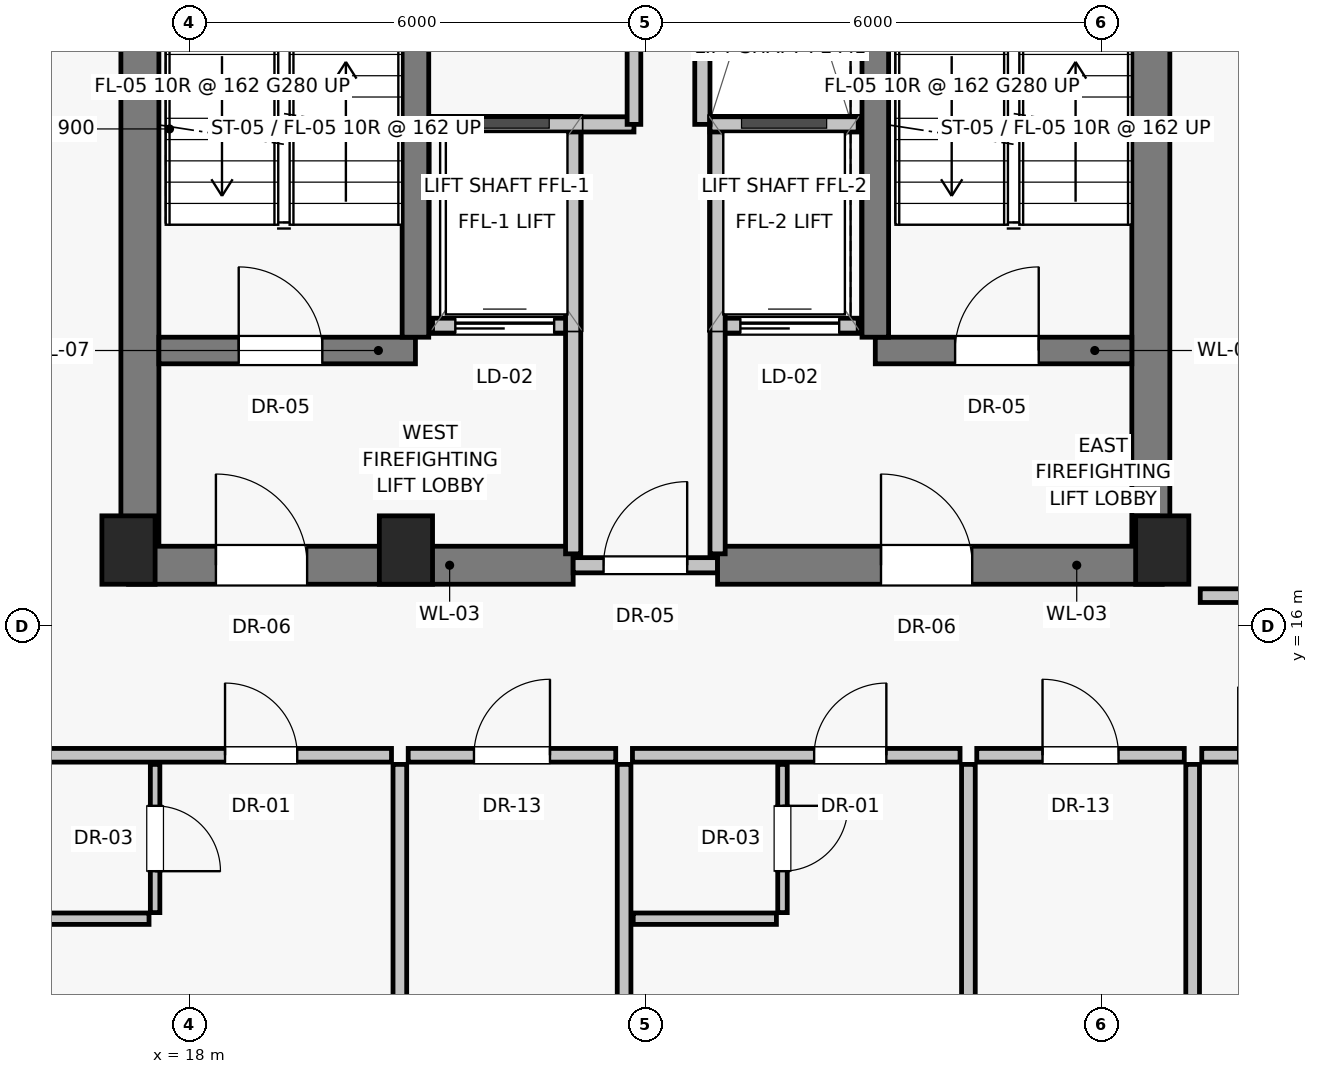
"""IFC4 building model, lengths in metres.
Left out: names, types, materials, properties, quantities, classifications, styles, units other than length and angle.
Written with IfcOpenShell. Run it as: python <this file> out.ifc"""

import sys

from ifc_helpers import new_model, si_unit, direction, frame, frame_2d, origin, origin_2d, place, context, subcontext, project, spatial, rectangle, extrude, source, transform, mapped, element, fill, save


model = new_model("IFC4")
c1 = context("Model", 3, precision=1e-05, world=origin(), true_north=direction((0.0, 1.0)))
c2 = subcontext(c1, "Body", "Model", "MODEL_VIEW")
j1 = project(units=[si_unit("LENGTHUNIT", "METRE"), si_unit("PLANEANGLEUNIT", "RADIAN")], contexts=[c1])
p1 = place(None, origin())
s1 = spatial("IfcSite", under=j1, at=p1, CompositionType="ELEMENT")
p2 = place(p1, origin())
s2 = spatial("IfcBuilding", under=s1, at=p2, CompositionType="ELEMENT")
p3 = place(p2, frame((0.0, 0.0, 182.1)))
s3 = spatial("IfcBuildingStorey", under=s2, at=p3, CompositionType="ELEMENT", Elevation=182.1)
for number, where, z_axis, x_axis in (
    (1, (17.2, 17.0, 0.0), (0.0, 0.0, 1.0), (1.0, 0.0, 0.0)),
    (2, (20.85, 17.0, 0.0), (0.0, 0.0, 1.0), (1.0, 0.0, 0.0)),
    (3, (30.8, 17.0, 0.0), (0.0, 0.0, 1.0), (1.0, 0.0, 0.0)),
):
    element("IfcColumn", number, at=place(p3, frame(where, z_axis=z_axis, x_axis=x_axis)), inside=s3, PredefinedType="PILASTER", context=c2, shape_type="SweptSolid", body=[
        extrude(rectangle(XDim=0.7, YDim=0.9, at=origin_2d()), origin(), (0.0, 0.0, 1.0), 3.25),
    ])
for number, where, z_axis, x_axis in (
    (4, (17.35, 16.8, 0.0), (0.0, 0.0, 1.0), (0.0, 1.0, 0.0)),
    (5, (30.65, 16.8, 0.0), (0.0, 0.0, 1.0), (0.0, 1.0, 0.0)),
):
    element("IfcWall", number, at=place(p3, frame(where, z_axis=z_axis, x_axis=x_axis)), inside=s3, PredefinedType="SHEAR", context=c2, shape_type="SweptSolid", body=[
        extrude(rectangle(XDim=14.2, YDim=0.5, at=frame_2d((7.1, 0.0))), origin(), (0.0, 0.0, 1.0), 3.015),
    ])
p4 = place(p3, frame((17.2, 16.8, 0.0), z_axis=(0.0, 0.0, 1.0), x_axis=(1.0, 0.0, 0.0)))
e6 = element("IfcWall", 6, at=p4, inside=s3, PredefinedType="SHEAR", context=c2, shape_type="SweptSolid", body=[
    extrude(rectangle(XDim=5.85, YDim=0.5, at=frame_2d((2.925, 0.0))), origin(), (0.0, 0.0, 1.0), 3.015),
])
p5 = place(p4, frame((1.15, 0.0, 0.0)))
e7 = element("IfcOpeningElement", 7, at=p5, cuts=e6, PredefinedType="OPENING", context=c2, shape_type="SweptSolid", body=[
    extrude(rectangle(XDim=1.2, YDim=2.03, at=frame_2d((0.6, 1.015))), frame((0.0, 0.26, 0.0), z_axis=(0.0, -1.0, 0.0), x_axis=(1.0, 0.0, 0.0)), (0.0, 0.0, 1.0), 0.52),
])
p6 = place(p3, frame((23.05, 16.8, 0.0), z_axis=(0.0, 0.0, 1.0), x_axis=(1.0, 0.0, 0.0)))
e8 = element("IfcWall", 8, at=p6, inside=s3, PredefinedType="SOLIDWALL", context=c2, shape_type="SweptSolid", body=[
    extrude(rectangle(XDim=1.9, YDim=0.2, at=frame_2d((0.95, 0.0))), origin(), (0.0, 0.0, 1.0), 2.165),
])
p7 = place(p6, frame((0.4, 0.0, 0.0)))
e9 = element("IfcOpeningElement", 9, at=p7, cuts=e8, PredefinedType="OPENING", context=c2, shape_type="SweptSolid", body=[
    extrude(rectangle(XDim=1.1, YDim=2.03, at=frame_2d((0.55, 1.015))), frame((0.0, 0.11, 0.0), z_axis=(0.0, -1.0, 0.0), x_axis=(1.0, 0.0, 0.0)), (0.0, 0.0, 1.0), 0.22),
])
p8 = place(p3, frame((24.95, 16.8, 0.0), z_axis=(0.0, 0.0, 1.0), x_axis=(1.0, 0.0, 0.0)))
e10 = element("IfcWall", 10, at=p8, inside=s3, PredefinedType="SHEAR", context=c2, shape_type="SweptSolid", body=[
    extrude(rectangle(XDim=5.85, YDim=0.5, at=frame_2d((2.925, 0.0))), origin(), (0.0, 0.0, 1.0), 3.015),
])
p9 = place(p8, frame((2.15, 0.0, 0.0)))
e11 = element("IfcOpeningElement", 11, at=p9, cuts=e10, PredefinedType="OPENING", context=c2, shape_type="SweptSolid", body=[
    extrude(rectangle(XDim=1.2, YDim=2.03, at=frame_2d((0.6, 1.015))), frame((0.0, 0.26, 0.0), z_axis=(0.0, -1.0, 0.0), x_axis=(1.0, 0.0, 0.0)), (0.0, 0.0, 1.0), 0.52),
])
p10 = place(p3, frame((17.6, 19.625, 0.0), z_axis=(0.0, 0.0, 1.0), x_axis=(1.0, 0.0, 0.0)))
e12 = element("IfcWall", 12, at=p10, inside=s3, PredefinedType="SHEAR", context=c2, shape_type="SweptSolid", body=[
    extrude(rectangle(XDim=3.375, YDim=0.35, at=frame_2d((1.688, 0.0))), origin(), (0.0, 0.0, 1.0), 3.015),
])
p11 = place(p10, frame((1.05, 0.0, 0.0)))
e13 = element("IfcOpeningElement", 13, at=p11, cuts=e12, PredefinedType="OPENING", context=c2, shape_type="SweptSolid", body=[
    extrude(rectangle(XDim=1.1, YDim=2.03, at=frame_2d((0.55, 1.015))), frame((0.0, 0.185, 0.0), z_axis=(0.0, -1.0, 0.0), x_axis=(1.0, 0.0, 0.0)), (0.0, 0.0, 1.0), 0.37),
])
p12 = place(p3, frame((21.2, 19.95, 0.0), z_axis=(0.0, 0.0, 1.0), x_axis=(1.0, 0.0, 0.0)))
e14 = element("IfcWall", 14, at=p12, inside=s3, PredefinedType="SOLIDWALL", context=c2, shape_type="SweptSolid", body=[
    extrude(rectangle(XDim=1.85, YDim=0.2, at=frame_2d((0.925, 0.0))), origin(), (0.0, 0.0, 1.0), 3.015),
])
p13 = place(p12, frame((0.3, 0.0, 0.0)))
e15 = element("IfcOpeningElement", 15, at=p13, cuts=e14, PredefinedType="OPENING", context=c2, shape_type="SweptSolid", body=[
    extrude(rectangle(XDim=1.3, YDim=2.25, at=frame_2d((0.65, 1.125))), frame((0.0, 0.11, 0.0), z_axis=(0.0, -1.0, 0.0), x_axis=(1.0, 0.0, 0.0)), (0.0, 0.0, 1.0), 0.22),
])
p14 = place(p3, frame((24.95, 19.95, 0.0), z_axis=(0.0, 0.0, 1.0), x_axis=(1.0, 0.0, 0.0)))
e16 = element("IfcWall", 16, at=p14, inside=s3, PredefinedType="SOLIDWALL", context=c2, shape_type="SweptSolid", body=[
    extrude(rectangle(XDim=1.85, YDim=0.2, at=frame_2d((0.925, 0.0))), origin(), (0.0, 0.0, 1.0), 3.015),
])
p15 = place(p14, frame((0.3, 0.0, 0.0)))
e17 = element("IfcOpeningElement", 17, at=p15, cuts=e16, PredefinedType="OPENING", context=c2, shape_type="SweptSolid", body=[
    extrude(rectangle(XDim=1.3, YDim=2.25, at=frame_2d((0.65, 1.125))), frame((0.0, 0.11, 0.0), z_axis=(0.0, -1.0, 0.0), x_axis=(1.0, 0.0, 0.0)), (0.0, 0.0, 1.0), 0.22),
])
p16 = place(p3, frame((27.025, 19.625, 0.0), z_axis=(0.0, 0.0, 1.0), x_axis=(1.0, 0.0, 0.0)))
e18 = element("IfcWall", 18, at=p16, inside=s3, PredefinedType="SHEAR", context=c2, shape_type="SweptSolid", body=[
    extrude(rectangle(XDim=3.375, YDim=0.35, at=frame_2d((1.688, 0.0))), origin(), (0.0, 0.0, 1.0), 3.015),
])
p17 = place(p16, frame((1.05, 0.0, 0.0)))
e19 = element("IfcOpeningElement", 19, at=p17, cuts=e18, PredefinedType="OPENING", context=c2, shape_type="SweptSolid", body=[
    extrude(rectangle(XDim=1.1, YDim=2.03, at=frame_2d((0.55, 1.015))), frame((0.0, 0.185, 0.0), z_axis=(0.0, -1.0, 0.0), x_axis=(1.0, 0.0, 0.0)), (0.0, 0.0, 1.0), 0.37),
])
for number, where, z_axis, x_axis in (
    (20, (20.975, 19.8, 0.0), (0.0, 0.0, 1.0), (0.0, 1.0, 0.0)),
    (21, (27.025, 19.8, 0.0), (0.0, 0.0, 1.0), (0.0, 1.0, 0.0)),
):
    element("IfcWall", number, at=place(p3, frame(where, z_axis=z_axis, x_axis=x_axis)), inside=s3, PredefinedType="SHEAR", context=c2, shape_type="SweptSolid", body=[
        extrude(rectangle(XDim=8.775, YDim=0.35, at=frame_2d((4.387, 0.0))), origin(), (0.0, 0.0, 1.0), 3.015),
    ])
for number, where, z_axis, x_axis in (
    (22, (23.05, 16.95, 0.0), (0.0, 0.0, 1.0), (0.0, 1.0, 0.0)),
    (23, (24.95, 16.95, 0.0), (0.0, 0.0, 1.0), (0.0, 1.0, 0.0)),
):
    element("IfcWall", number, at=place(p3, frame(where, z_axis=z_axis, x_axis=x_axis)), inside=s3, PredefinedType="SOLIDWALL", context=c2, shape_type="SweptSolid", body=[
        extrude(rectangle(XDim=5.6, YDim=0.2, at=frame_2d((2.8, 0.0))), origin(), (0.0, 0.0, 1.0), 3.015),
    ])
p18 = place(p3, frame((21.2, 22.6, 0.0), z_axis=(0.0, 0.0, 1.0), x_axis=(1.0, 0.0, 0.0)))
e24 = element("IfcWall", 24, at=p18, inside=s3, PredefinedType="SOLIDWALL", context=c2, shape_type="SweptSolid", body=[
    extrude(rectangle(XDim=2.65, YDim=0.2, at=frame_2d((1.325, 0.0))), origin(), (0.0, 0.0, 1.0), 3.015),
])
p19 = place(p3, frame((24.85, 22.6, 0.0), z_axis=(0.0, 0.0, 1.0), x_axis=(1.0, 0.0, 0.0)))
e25 = element("IfcWall", 25, at=p19, inside=s3, PredefinedType="SOLIDWALL", context=c2, shape_type="SweptSolid", body=[
    extrude(rectangle(XDim=1.95, YDim=0.2, at=frame_2d((0.975, 0.0))), origin(), (0.0, 0.0, 1.0), 3.015),
])
p20 = place(p3, frame((23.85, 22.6, 0.0), z_axis=(0.0, 0.0, 1.0), x_axis=(0.0, 1.0, 0.0)))
e26 = element("IfcWall", 26, at=p20, inside=s3, PredefinedType="PARTITIONING", context=c2, shape_type="SweptSolid", body=[
    extrude(rectangle(XDim=6.1, YDim=0.18, at=frame_2d((3.05, 0.0))), origin(), (0.0, 0.0, 1.0), 3.015),
])
p21 = place(p20, frame((2.4, 0.0, 0.0)))
e27 = element("IfcOpeningElement", 27, at=p21, cuts=e26, PredefinedType="OPENING", context=c2, shape_type="SweptSolid", body=[
    extrude(rectangle(XDim=0.9, YDim=2.01, at=frame_2d((0.45, 1.005))), frame((0.0, 0.1, 0.0), z_axis=(0.0, -1.0, 0.0), x_axis=(1.0, 0.0, 0.0)), (0.0, 0.0, 1.0), 0.2),
])
p22 = place(p3, frame((24.75, 22.6, 0.0), z_axis=(0.0, 0.0, 1.0), x_axis=(0.0, 1.0, 0.0)))
e28 = element("IfcWall", 28, at=p22, inside=s3, PredefinedType="SOLIDWALL", context=c2, shape_type="SweptSolid", body=[
    extrude(rectangle(XDim=5.95, YDim=0.2, at=frame_2d((2.975, 0.0))), origin(), (0.0, 0.0, 1.0), 3.015),
])
p23 = place(p3, frame((31.2, 14.18, 0.0), z_axis=(0.0, 0.0, 1.0), x_axis=(0.0, -1.0, 0.0)))
e29 = element("IfcWall", 29, at=p23, inside=s3, PredefinedType="PARTITIONING", context=c2, shape_type="SweptSolid", body=[
    extrude(rectangle(XDim=6.991, YDim=0.18, at=frame_2d((3.495, 0.0))), origin(), (0.0, 0.0, 1.0), 3.015),
])
p24 = place(p3, frame((20.88, 14.3, 0.0), z_axis=(0.0, 0.0, 1.0), x_axis=(1.0, 0.0, 0.0)))
e30 = element("IfcWall", 30, at=p24, inside=s3, PredefinedType="PARTITIONING", context=c2, shape_type="SweptSolid", body=[
    extrude(rectangle(XDim=2.73, YDim=0.18, at=frame_2d((1.365, 0.0))), origin(), (0.0, 0.0, 1.0), 3.015),
])
p25 = place(p24, frame((0.865, 0.0, 0.0)))
e31 = element("IfcOpeningElement", 31, at=p25, cuts=e30, PredefinedType="OPENING", context=c2, shape_type="SweptSolid", body=[
    extrude(rectangle(XDim=1.0, YDim=2.01, at=frame_2d((0.5, 1.005))), frame((0.0, 0.1, 0.0), z_axis=(0.0, -1.0, 0.0), x_axis=(1.0, 0.0, 0.0)), (0.0, 0.0, 1.0), 0.2),
])
p26 = place(p3, frame((20.77, 14.18, 0.0), z_axis=(0.0, 0.0, 1.0), x_axis=(0.0, -1.0, 0.0)))
e32 = element("IfcWall", 32, at=p26, inside=s3, PredefinedType="PARTITIONING", context=c2, shape_type="SweptSolid", body=[
    extrude(rectangle(XDim=8.063, YDim=0.18, at=frame_2d((4.031, 0.0))), origin(), (0.0, 0.0, 1.0), 2.469),
])
p27 = place(p3, frame((15.31, 14.3, 0.0), z_axis=(0.0, 0.0, 1.0), x_axis=(1.0, 0.0, 0.0)))
e33 = element("IfcWall", 33, at=p27, inside=s3, PredefinedType="PARTITIONING", context=c2, shape_type="SweptSolid", body=[
    extrude(rectangle(XDim=5.35, YDim=0.18, at=frame_2d((2.675, 0.0))), origin(), (0.0, 0.0, 1.0), 3.015),
])
p28 = place(p27, frame((3.16, 0.0, 0.0)))
e34 = element("IfcOpeningElement", 34, at=p28, cuts=e33, PredefinedType="OPENING", context=c2, shape_type="SweptSolid", body=[
    extrude(rectangle(XDim=0.95, YDim=2.02, at=frame_2d((0.475, 1.01))), frame((0.0, 0.1, 0.0), z_axis=(0.0, -1.0, 0.0), x_axis=(1.0, 0.0, 0.0)), (0.0, 0.0, 1.0), 0.2),
])
p29 = place(p3, frame((17.55, 14.18, 0.0), z_axis=(0.0, 0.0, 1.0), x_axis=(0.0, -1.0, 0.0)))
e35 = element("IfcWall", 35, at=p29, inside=s3, PredefinedType="PARTITIONING", context=c2, shape_type="SweptSolid", body=[
    extrude(rectangle(XDim=1.95, YDim=0.125, at=frame_2d((0.975, 0.0))), origin(), (0.0, 0.0, 1.0), 3.015),
])
p30 = place(p29, frame((0.545, 0.0, 0.0)))
e36 = element("IfcOpeningElement", 36, at=p30, cuts=e35, PredefinedType="OPENING", context=c2, shape_type="SweptSolid", body=[
    extrude(rectangle(XDim=0.86, YDim=2.01, at=frame_2d((0.43, 1.005))), frame((0.0, 0.073, 0.0), z_axis=(0.0, -1.0, 0.0), x_axis=(1.0, 0.0, 0.0)), (0.0, 0.0, 1.0), 0.145),
])
p31 = place(p3, frame((15.32, 12.15, 0.0), z_axis=(0.0, 0.0, 1.0), x_axis=(1.0, 0.0, 0.0)))
e37 = element("IfcWall", 37, at=p31, inside=s3, PredefinedType="PARTITIONING", context=c2, shape_type="SweptSolid", body=[
    extrude(rectangle(XDim=2.15, YDim=0.15, at=frame_2d((1.075, 0.0))), origin(), (0.0, 0.0, 1.0), 3.015),
])
p32 = place(p3, frame((23.72, 14.18, 0.0), z_axis=(0.0, 0.0, 1.0), x_axis=(0.0, -1.0, 0.0)))
e38 = element("IfcWall", 38, at=p32, inside=s3, PredefinedType="PARTITIONING", context=c2, shape_type="SweptSolid", body=[
    extrude(rectangle(XDim=9.301, YDim=0.18, at=frame_2d((4.65, 0.0))), origin(), (0.0, 0.0, 1.0), 3.015),
])
p33 = place(p3, frame((28.36, 14.3, 0.0), z_axis=(0.0, 0.0, 1.0), x_axis=(1.0, 0.0, 0.0)))
e39 = element("IfcWall", 39, at=p33, inside=s3, PredefinedType="PARTITIONING", context=c2, shape_type="SweptSolid", body=[
    extrude(rectangle(XDim=2.73, YDim=0.18, at=frame_2d((1.365, 0.0))), origin(), (0.0, 0.0, 1.0), 3.015),
])
p34 = place(p33, frame((0.865, 0.0, 0.0)))
e40 = element("IfcOpeningElement", 40, at=p34, cuts=e39, PredefinedType="OPENING", context=c2, shape_type="SweptSolid", body=[
    extrude(rectangle(XDim=1.0, YDim=2.01, at=frame_2d((0.5, 1.005))), frame((0.0, 0.1, 0.0), z_axis=(0.0, -1.0, 0.0), x_axis=(1.0, 0.0, 0.0)), (0.0, 0.0, 1.0), 0.2),
])
p35 = place(p3, frame((28.25, 14.18, 0.0), z_axis=(0.0, 0.0, 1.0), x_axis=(0.0, -1.0, 0.0)))
e41 = element("IfcWall", 41, at=p35, inside=s3, PredefinedType="PARTITIONING", context=c2, shape_type="SweptSolid", body=[
    extrude(rectangle(XDim=9.169, YDim=0.18, at=frame_2d((4.584, 0.0))), origin(), (0.0, 0.0, 1.0), 2.469),
])
p36 = place(p3, frame((23.83, 14.3, 0.0), z_axis=(0.0, 0.0, 1.0), x_axis=(1.0, 0.0, 0.0)))
e42 = element("IfcWall", 42, at=p36, inside=s3, PredefinedType="PARTITIONING", context=c2, shape_type="SweptSolid", body=[
    extrude(rectangle(XDim=4.31, YDim=0.18, at=frame_2d((2.155, 0.0))), origin(), (0.0, 0.0, 1.0), 3.015),
])
p37 = place(p36, frame((2.39, 0.0, 0.0)))
e43 = element("IfcOpeningElement", 43, at=p37, cuts=e42, PredefinedType="OPENING", context=c2, shape_type="SweptSolid", body=[
    extrude(rectangle(XDim=0.95, YDim=2.02, at=frame_2d((0.475, 1.01))), frame((0.0, 0.1, 0.0), z_axis=(0.0, -1.0, 0.0), x_axis=(1.0, 0.0, 0.0)), (0.0, 0.0, 1.0), 0.2),
])
p38 = place(p3, frame((25.804, 14.18, 0.0), z_axis=(0.0, 0.0, 1.0), x_axis=(0.0, -1.0, 0.0)))
e44 = element("IfcWall", 44, at=p38, inside=s3, PredefinedType="PARTITIONING", context=c2, shape_type="SweptSolid", body=[
    extrude(rectangle(XDim=1.95, YDim=0.125, at=frame_2d((0.975, 0.0))), origin(), (0.0, 0.0, 1.0), 3.015),
])
p39 = place(p38, frame((0.545, 0.0, 0.0)))
e45 = element("IfcOpeningElement", 45, at=p39, cuts=e44, PredefinedType="OPENING", context=c2, shape_type="SweptSolid", body=[
    extrude(rectangle(XDim=0.86, YDim=2.01, at=frame_2d((0.43, 1.005))), frame((0.0, 0.073, 0.0), z_axis=(0.0, -1.0, 0.0), x_axis=(1.0, 0.0, 0.0)), (0.0, 0.0, 1.0), 0.145),
])
p40 = place(p3, frame((23.84, 12.15, 0.0), z_axis=(0.0, 0.0, 1.0), x_axis=(1.0, 0.0, 0.0)))
e46 = element("IfcWall", 46, at=p40, inside=s3, PredefinedType="PARTITIONING", context=c2, shape_type="SweptSolid", body=[
    extrude(rectangle(XDim=1.884, YDim=0.15, at=frame_2d((0.942, 0.0))), origin(), (0.0, 0.0, 1.0), 3.015),
])
p41 = place(p3, frame((31.3, 16.4, 0.0), z_axis=(0.0, 0.0, 1.0), x_axis=(1.0, 0.0, 0.0)))
e47 = element("IfcWall", 47, at=p41, inside=s3, PredefinedType="PARTITIONING", context=c2, shape_type="SweptSolid", body=[
    extrude(rectangle(XDim=1.92, YDim=0.18, at=frame_2d((0.96, 0.0))), origin(), (0.0, 0.0, 1.0), 3.015),
])
p42 = place(p41, frame((0.72, 0.0, 0.0)))
e48 = element("IfcOpeningElement", 48, at=p42, cuts=e47, PredefinedType="OPENING", context=c2, shape_type="SweptSolid", body=[
    extrude(rectangle(XDim=1.0, YDim=2.01, at=frame_2d((0.5, 1.005))), frame((0.0, 0.1, 0.0), z_axis=(0.0, -1.0, 0.0), x_axis=(1.0, 0.0, 0.0)), (0.0, 0.0, 1.0), 0.2),
])
p43 = place(p3, frame((31.32, 14.3, 0.0), z_axis=(0.0, 0.0, 1.0), x_axis=(1.0, 0.0, 0.0)))
e49 = element("IfcWall", 49, at=p43, inside=s3, PredefinedType="PARTITIONING", context=c2, shape_type="SweptSolid", body=[
    extrude(rectangle(XDim=1.86, YDim=0.18, at=frame_2d((0.93, 0.0))), origin(), (0.0, 0.0, 1.0), 3.015),
])
p44 = place(p43, frame((0.48, 0.0, 0.0)))
e50 = element("IfcOpeningElement", 50, at=p44, cuts=e49, PredefinedType="OPENING", context=c2, shape_type="SweptSolid", body=[
    extrude(rectangle(XDim=0.9, YDim=2.01, at=frame_2d((0.45, 1.005))), frame((0.0, 0.1, 0.0), z_axis=(0.0, -1.0, 0.0), x_axis=(1.0, 0.0, 0.0)), (0.0, 0.0, 1.0), 0.2),
])
m1 = source(origin(), c2, "Body", "SweptSolid", [
    extrude(rectangle(XDim=1.2, YDim=2.03, at=frame_2d((0.6, 1.015))), frame((0.0, 0.025, 0.0), z_axis=(0.0, -1.0, 0.0), x_axis=(1.0, 0.0, 0.0)), (0.0, 0.0, 1.0), 0.05),
])
p45 = place(p5, origin())
e51 = element("IfcDoor", 51, at=p45, inside=s3, OperationType="SINGLE_SWING_LEFT", PredefinedType="DOOR", context=c2, shape_type="MappedRepresentation", body=[
    mapped(m1, transform((0.0, 0.0, 0.0), scale=1.0)),
])
fill(e7, e51)
m2 = source(origin(), c2, "Body", "SweptSolid", [
    extrude(rectangle(XDim=1.1, YDim=2.03, at=frame_2d((0.55, 1.015))), frame((0.0, 0.025, 0.0), z_axis=(0.0, -1.0, 0.0), x_axis=(1.0, 0.0, 0.0)), (0.0, 0.0, 1.0), 0.05),
])
p46 = place(p7, origin())
e52 = element("IfcDoor", 52, at=p46, inside=s3, OperationType="SINGLE_SWING_RIGHT", PredefinedType="DOOR", context=c2, shape_type="MappedRepresentation", body=[
    mapped(m2, transform((0.0, 0.0, 0.0), scale=1.0)),
])
fill(e9, e52)
p47 = place(p9, origin())
e53 = element("IfcDoor", 53, at=p47, inside=s3, OperationType="SINGLE_SWING_LEFT", PredefinedType="DOOR", context=c2, shape_type="MappedRepresentation", body=[
    mapped(m1, transform((0.0, 0.0, 0.0), scale=1.0)),
])
fill(e11, e53)
p48 = place(p11, origin())
e54 = element("IfcDoor", 54, at=p48, inside=s3, OperationType="SINGLE_SWING_LEFT", PredefinedType="DOOR", context=c2, shape_type="MappedRepresentation", body=[
    mapped(m2, transform((0.0, 0.0, 0.0), scale=1.0)),
])
fill(e13, e54)
m3 = source(origin(), c2, "Body", "SweptSolid", [
    extrude(rectangle(XDim=1.3, YDim=2.25, at=frame_2d((0.65, 1.125))), frame((0.0, 0.025, 0.0), z_axis=(0.0, -1.0, 0.0), x_axis=(1.0, 0.0, 0.0)), (0.0, 0.0, 1.0), 0.05),
])
p49 = place(p13, origin())
e55 = element("IfcDoor", 55, at=p49, inside=s3, OperationType="SLIDING_TO_LEFT", PredefinedType="DOOR", context=c2, shape_type="MappedRepresentation", body=[
    mapped(m3, transform((0.0, 0.0, 0.0), scale=1.0)),
])
fill(e15, e55)
p50 = place(p15, origin())
e56 = element("IfcDoor", 56, at=p50, inside=s3, OperationType="SLIDING_TO_LEFT", PredefinedType="DOOR", context=c2, shape_type="MappedRepresentation", body=[
    mapped(m3, transform((0.0, 0.0, 0.0), scale=1.0)),
])
fill(e17, e56)
p51 = place(p17, origin())
e57 = element("IfcDoor", 57, at=p51, inside=s3, OperationType="SINGLE_SWING_RIGHT", PredefinedType="DOOR", context=c2, shape_type="MappedRepresentation", body=[
    mapped(m2, transform((0.0, 0.0, 0.0), scale=1.0)),
])
fill(e19, e57)
m4 = source(origin(), c2, "Body", "SweptSolid", [
    extrude(rectangle(XDim=1.0, YDim=2.01, at=frame_2d((0.5, 1.005))), frame((0.0, 0.025, 0.0), z_axis=(0.0, -1.0, 0.0), x_axis=(1.0, 0.0, 0.0)), (0.0, 0.0, 1.0), 0.05),
])
p52 = place(p25, origin())
e58 = element("IfcDoor", 58, at=p52, inside=s3, OperationType="SINGLE_SWING_RIGHT", PredefinedType="DOOR", context=c2, shape_type="MappedRepresentation", body=[
    mapped(m4, transform((0.0, 0.0, 0.0), scale=1.0)),
])
fill(e31, e58)
m5 = source(origin(), c2, "Body", "SweptSolid", [
    extrude(rectangle(XDim=0.95, YDim=2.02, at=frame_2d((0.475, 1.01))), frame((0.0, 0.025, 0.0), z_axis=(0.0, -1.0, 0.0), x_axis=(1.0, 0.0, 0.0)), (0.0, 0.0, 1.0), 0.05),
])
p53 = place(p28, origin())
e59 = element("IfcDoor", 59, at=p53, inside=s3, OperationType="SINGLE_SWING_LEFT", PredefinedType="DOOR", context=c2, shape_type="MappedRepresentation", body=[
    mapped(m5, transform((0.0, 0.0, 0.0), scale=1.0)),
])
fill(e34, e59)
m6 = source(origin(), c2, "Body", "SweptSolid", [
    extrude(rectangle(XDim=0.86, YDim=2.01, at=frame_2d((0.43, 1.005))), frame((0.0, 0.025, 0.0), z_axis=(0.0, -1.0, 0.0), x_axis=(1.0, 0.0, 0.0)), (0.0, 0.0, 1.0), 0.05),
])
p54 = place(p30, origin())
e60 = element("IfcDoor", 60, at=p54, inside=s3, OperationType="SINGLE_SWING_RIGHT", PredefinedType="DOOR", context=c2, shape_type="MappedRepresentation", body=[
    mapped(m6, transform((0.0, 0.0, 0.0), scale=1.0)),
])
fill(e36, e60)
p55 = place(p34, origin())
e61 = element("IfcDoor", 61, at=p55, inside=s3, OperationType="SINGLE_SWING_LEFT", PredefinedType="DOOR", context=c2, shape_type="MappedRepresentation", body=[
    mapped(m4, transform((0.0, 0.0, 0.0), scale=1.0)),
])
fill(e40, e61)
p56 = place(p37, origin())
e62 = element("IfcDoor", 62, at=p56, inside=s3, OperationType="SINGLE_SWING_RIGHT", PredefinedType="DOOR", context=c2, shape_type="MappedRepresentation", body=[
    mapped(m5, transform((0.0, 0.0, 0.0), scale=1.0)),
])
fill(e43, e62)
p57 = place(p39, origin())
e63 = element("IfcDoor", 63, at=p57, inside=s3, OperationType="SINGLE_SWING_LEFT", PredefinedType="DOOR", context=c2, shape_type="MappedRepresentation", body=[
    mapped(m6, transform((0.0, 0.0, 0.0), scale=1.0)),
])
fill(e45, e63)
save(model, sys.argv[1])
